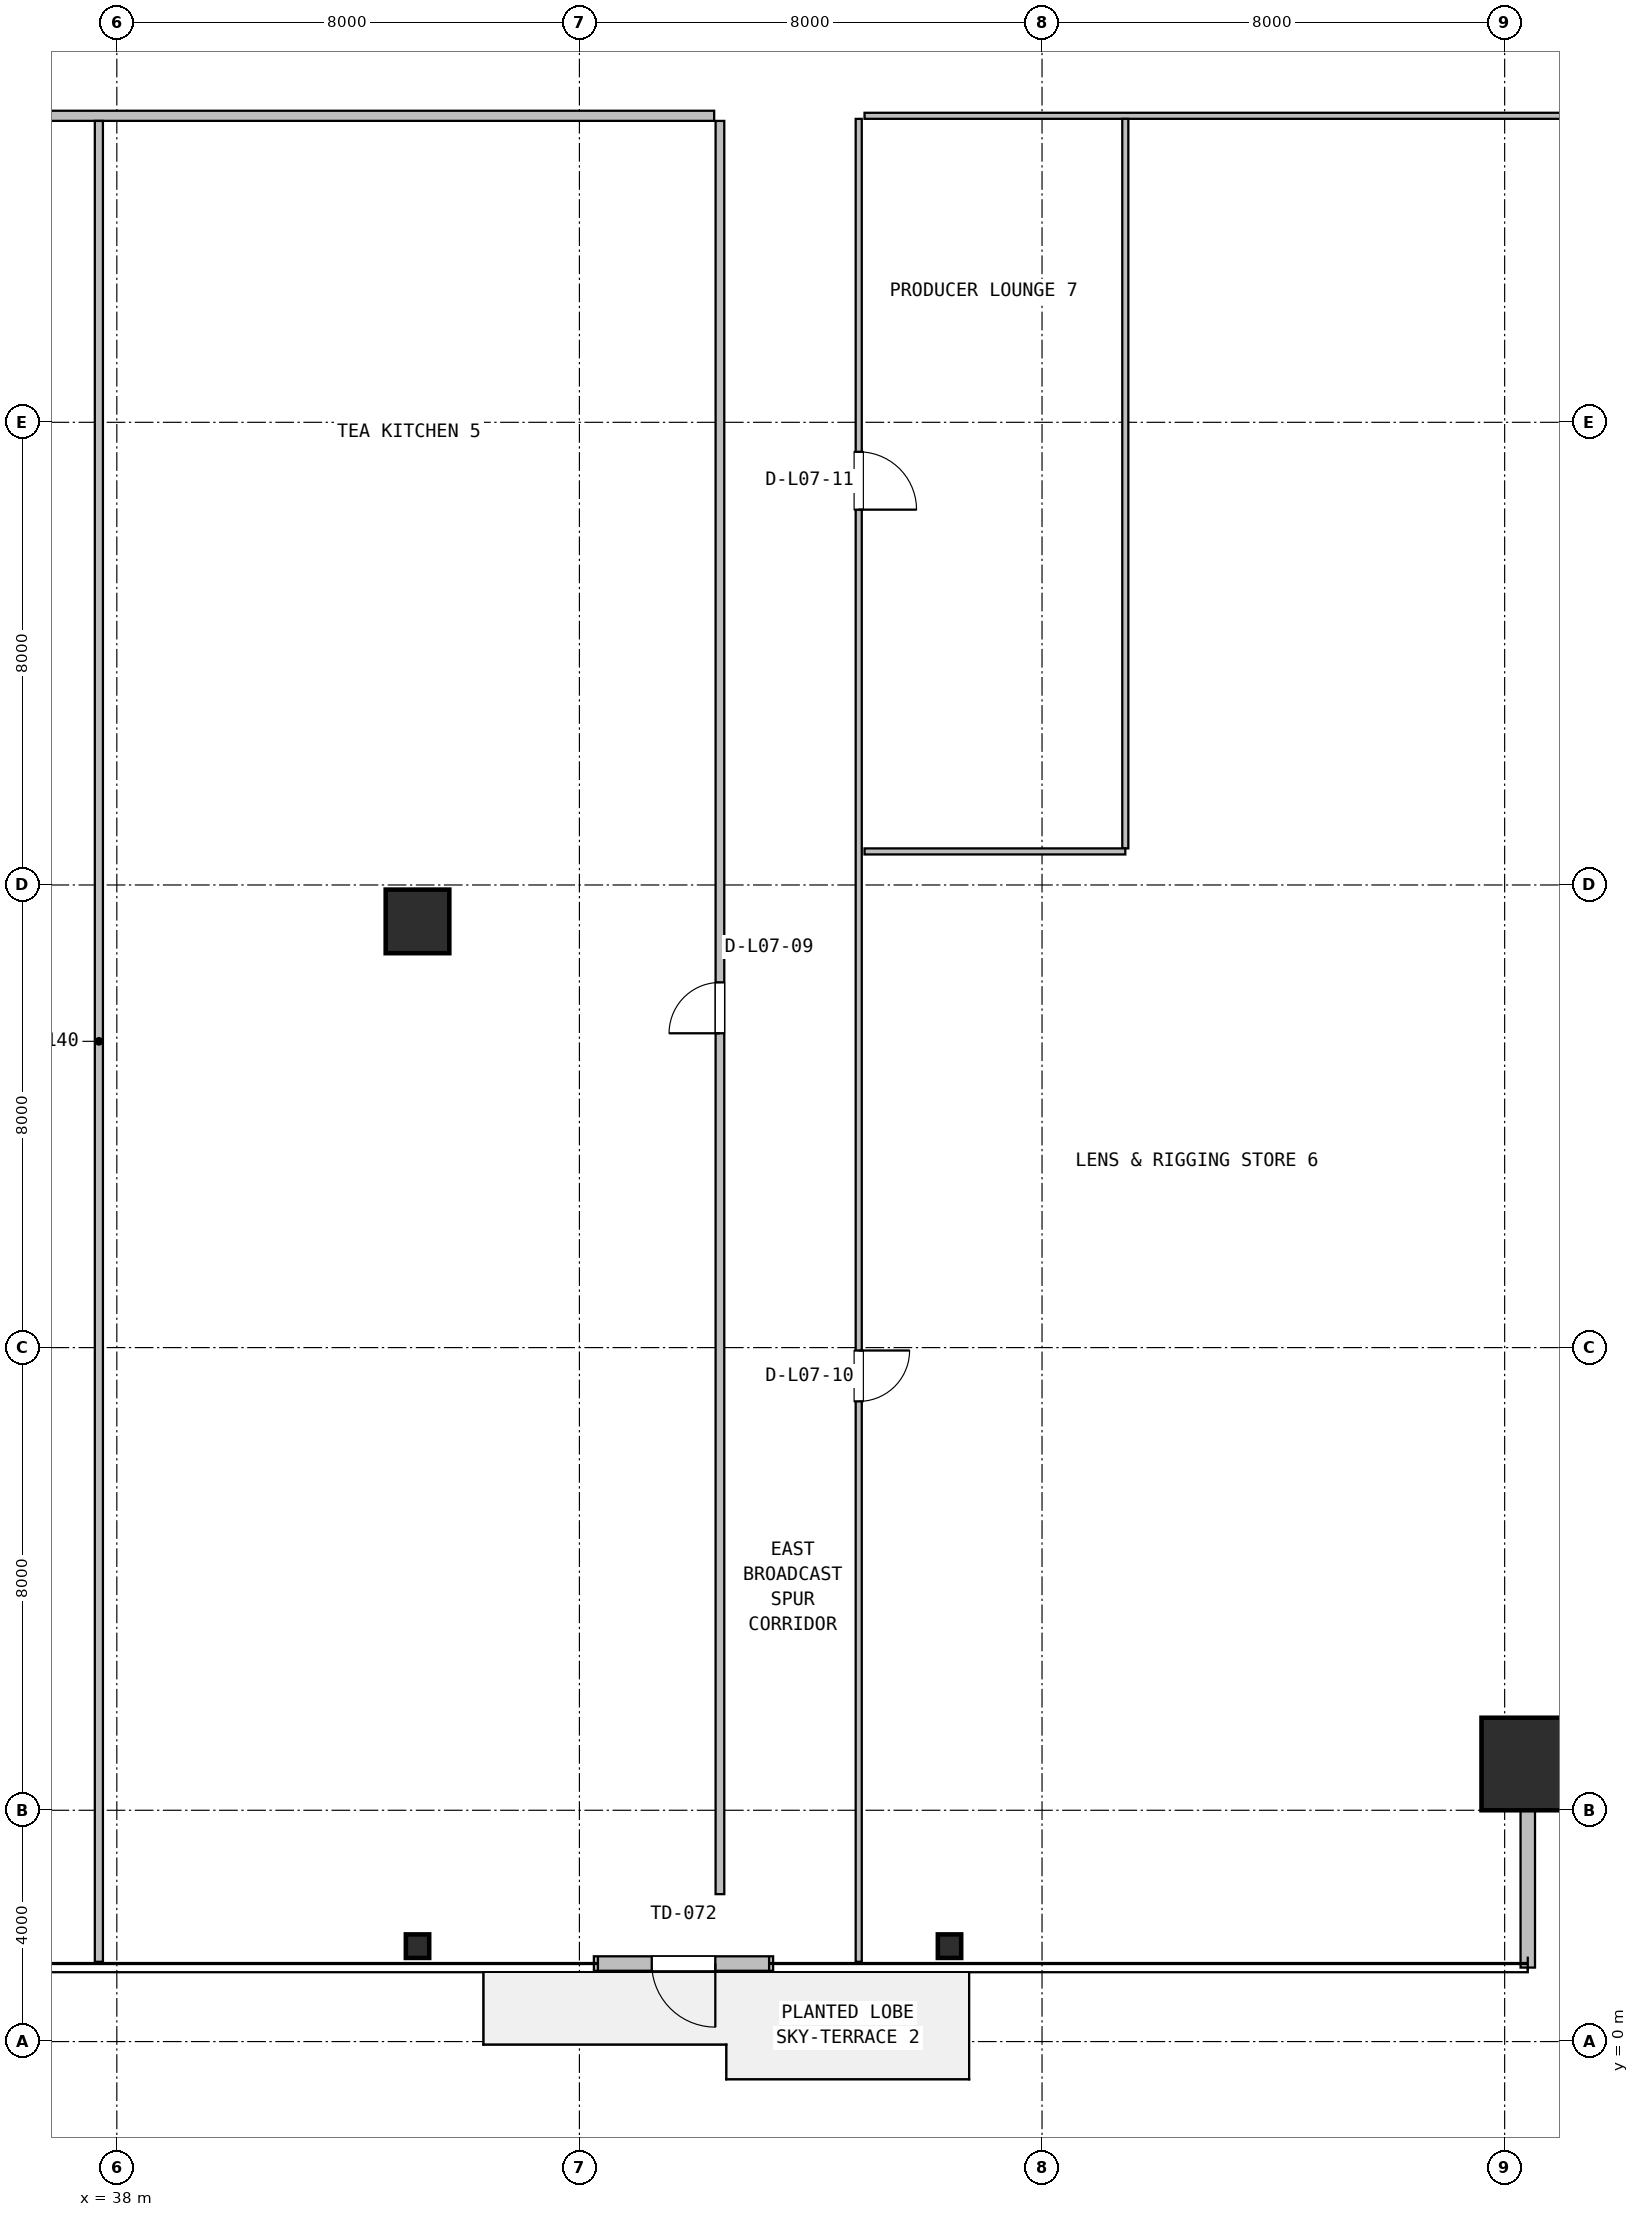
"""IFC4 building model, lengths in metres.
Left out: names, types, materials, properties, quantities, classifications, styles, units other than length and angle.
Written with IfcOpenShell. Run it as: python <this file> out.ifc"""

import sys

from ifc_helpers import new_model, si_unit, direction, frame, frame_2d, origin, origin_2d, place, context, subcontext, project, spatial, rectangle, hollow_rectangle, i_section, extrude, source, transform, mapped, element, fill, save


model = new_model("IFC4")
c1 = context("Model", 3, precision=1e-05, world=origin(), true_north=direction((0.0, 1.0)))
c2 = subcontext(c1, "Body", "Model", "MODEL_VIEW")
j1 = project(units=[si_unit("LENGTHUNIT", "METRE"), si_unit("PLANEANGLEUNIT", "RADIAN")], contexts=[c1])
p1 = place(None, origin())
s1 = spatial("IfcSite", under=j1, at=p1, CompositionType="ELEMENT")
p2 = place(p1, origin())
s2 = spatial("IfcBuilding", under=s1, at=p2, CompositionType="ELEMENT")
p3 = place(p2, frame((0.0, 0.0, 35.4)))
s3 = spatial("IfcBuildingStorey", under=s2, at=p3, CompositionType="ELEMENT", Elevation=35.4)
m1 = source(origin(), c2, "Body", "SweptSolid", [
    extrude(hollow_rectangle(XDim=1.6, YDim=1.6, WallThickness=0.06, at=origin_2d()), origin(), (0.0, 0.0, 1.0), 3.9),
])
p4 = place(p3, frame((62.4, 4.8, 0.0), z_axis=(0.0, 0.0, 1.0), x_axis=(1.0, 0.0, 0.0)))
e1 = element("IfcColumn", 1, at=p4, inside=s3, PredefinedType="COLUMN", context=c2, shape_type="MappedRepresentation", body=[
    mapped(m1, transform((0.0, 0.0, 0.0), x_axis=(1.0, 0.0, 0.0), y_axis=(0.0, 1.0, 0.0), z_axis=(0.0, 0.0, 1.0), scale=1.0)),
])
m2 = source(origin(), c2, "Body", "SweptSolid", [
    extrude(i_section(OverallWidth=0.404, OverallDepth=0.407, WebThickness=0.027, FlangeThickness=0.044, FilletRadius=0.018, at=origin_2d()), origin(), (0.0, 0.0, 1.0), 3.9),
])
for number, where, z_axis, x_axis in (
    (2, (43.2, 1.65, 0.0), (0.0, 0.0, 1.0), (1.0, 0.0, 0.0)),
    (3, (52.4, 1.65, 0.0), (0.0, 0.0, 1.0), (1.0, 0.0, 0.0)),
):
    element("IfcColumn", number, at=place(p3, frame(where, z_axis=z_axis, x_axis=x_axis)), inside=s3, PredefinedType="COLUMN", context=c2, shape_type="MappedRepresentation", body=[
        mapped(m2, transform((0.0, 0.0, 0.0), x_axis=(1.0, 0.0, 0.0), y_axis=(0.0, 1.0, 0.0), z_axis=(0.0, 0.0, 1.0), scale=1.0)),
    ])
m3 = source(origin(), c2, "Body", "SweptSolid", [
    extrude(rectangle(XDim=1.1, YDim=1.1, at=origin_2d()), origin(), (0.0, 0.0, 1.0), 3.9),
])
p5 = place(p3, frame((43.2, 19.37, 0.0), z_axis=(0.0, 0.0, 1.0), x_axis=(1.0, 0.0, 0.0)))
e4 = element("IfcColumn", 4, at=p5, inside=s3, PredefinedType="COLUMN", context=c2, shape_type="MappedRepresentation", body=[
    mapped(m3, transform((0.0, 0.0, 0.0), x_axis=(1.0, 0.0, 0.0), y_axis=(0.0, 1.0, 0.0), z_axis=(0.0, 0.0, 1.0), scale=1.0)),
])
p6 = place(p3, frame((46.25, 1.35, 0.0), z_axis=(0.0, 0.0, 1.0), x_axis=(1.0, 0.0, 0.0)))
e5 = element("IfcWall", 5, at=p6, inside=s3, PredefinedType="SOLIDWALL", context=c2, shape_type="SweptSolid", body=[
    extrude(rectangle(XDim=3.1, YDim=0.25, at=frame_2d((1.55, 0.0))), origin(), (0.0, 0.0, 1.0), 3.63),
])
p7 = place(p6, frame((1.0, 0.0, 0.0)))
e6 = element("IfcOpeningElement", 6, at=p7, cuts=e5, PredefinedType="OPENING", context=c2, shape_type="SweptSolid", body=[
    extrude(rectangle(XDim=1.1, YDim=2.15, at=frame_2d((0.55, 1.075))), frame((0.0, 0.135, 0.0), z_axis=(0.0, -1.0, 0.0), x_axis=(1.0, 0.0, 0.0)), (0.0, 0.0, 1.0), 0.27),
])
p8 = place(p3, frame((62.4, 1.28, 0.0), z_axis=(0.0, 0.0, 1.0), x_axis=(0.0, 1.0, 0.0)))
e7 = element("IfcWall", 7, at=p8, inside=s3, PredefinedType="SOLIDWALL", context=c2, shape_type="SweptSolid", body=[
    extrude(rectangle(XDim=3.6, YDim=0.25, at=frame_2d((1.8, 0.0))), origin(), (0.0, 0.0, 1.0), 3.208),
])
p9 = place(p3, frame((23.54, 33.3, 0.0), z_axis=(0.0, 0.0, 1.0), x_axis=(1.0, 0.0, 0.0)))
e8 = element("IfcWall", 8, at=p9, inside=s3, PredefinedType="PARTITIONING", context=c2, shape_type="SweptSolid", body=[
    extrude(rectangle(XDim=24.79, YDim=0.175, at=frame_2d((12.395, 0.0))), origin(), (0.0, 0.0, 1.0), 2.852),
])
p10 = place(p9, frame((9.62, 0.0, 0.0)))
e9 = element("IfcOpeningElement", 9, at=p10, cuts=e8, PredefinedType="OPENING", context=c2, shape_type="SweptSolid", body=[
    extrude(rectangle(XDim=1.0, YDim=2.1, at=frame_2d((0.5, 1.05))), frame((0.0, 0.098, 0.0), z_axis=(0.0, -1.0, 0.0), x_axis=(1.0, 0.0, 0.0)), (0.0, 0.0, 1.0), 0.195),
])
p11 = place(p3, frame((37.69, 1.38, 0.0), z_axis=(0.0, 0.0, 1.0), x_axis=(0.0, 1.0, 0.0)))
e10 = element("IfcWall", 10, at=p11, inside=s3, PredefinedType="PARTITIONING", context=c2, shape_type="SweptSolid", body=[
    extrude(rectangle(XDim=31.832, YDim=0.14, at=frame_2d((15.916, 0.0))), origin(), (0.0, 0.0, 1.0), 2.852),
])
p12 = place(p3, frame((48.43, 2.55, 0.0), z_axis=(0.0, 0.0, 1.0), x_axis=(0.0, 1.0, 0.0)))
e11 = element("IfcWall", 11, at=p12, inside=s3, PredefinedType="PARTITIONING", context=c2, shape_type="SweptSolid", body=[
    extrude(rectangle(XDim=30.662, YDim=0.15, at=frame_2d((15.331, 0.0))), origin(), (0.0, 0.0, 1.0), 3.322),
])
p13 = place(p12, frame((14.885, 0.0, 0.0)))
e12 = element("IfcOpeningElement", 12, at=p13, cuts=e11, PredefinedType="OPENING", context=c2, shape_type="SweptSolid", body=[
    extrude(rectangle(XDim=0.88, YDim=2.06, at=frame_2d((0.44, 1.03))), frame((0.0, 0.085, 0.0), z_axis=(0.0, -1.0, 0.0), x_axis=(1.0, 0.0, 0.0)), (0.0, 0.0, 1.0), 0.17),
])
p14 = place(p3, frame((50.93, 33.3, 0.0), z_axis=(0.0, 0.0, 1.0), x_axis=(1.0, 0.0, 0.0)))
e13 = element("IfcWall", 13, at=p14, inside=s3, PredefinedType="PARTITIONING", context=c2, shape_type="SweptSolid", body=[
    extrude(rectangle(XDim=14.89, YDim=0.105, at=frame_2d((7.445, 0.0))), origin(), (0.0, 0.0, 1.0), 3.208),
])
p15 = place(p3, frame((55.44, 20.632, 0.0), z_axis=(0.0, 0.0, 1.0), x_axis=(0.0, 1.0, 0.0)))
e14 = element("IfcWall", 14, at=p15, inside=s3, PredefinedType="PARTITIONING", context=c2, shape_type="SweptSolid", body=[
    extrude(rectangle(XDim=12.615, YDim=0.105, at=frame_2d((6.308, 0.0))), origin(), (0.0, 0.0, 1.0), 3.322),
])
p16 = place(p3, frame((50.93, 20.58, 0.0), z_axis=(0.0, 0.0, 1.0), x_axis=(1.0, 0.0, 0.0)))
e15 = element("IfcWall", 15, at=p16, inside=s3, PredefinedType="PARTITIONING", context=c2, shape_type="SweptSolid", body=[
    extrude(rectangle(XDim=4.51, YDim=0.105, at=frame_2d((2.255, 0.0))), origin(), (0.0, 0.0, 1.0), 3.63),
])
p17 = place(p3, frame((50.83, 1.38, 0.0), z_axis=(0.0, 0.0, 1.0), x_axis=(0.0, 1.0, 0.0)))
e16 = element("IfcWall", 16, at=p17, inside=s3, PredefinedType="PARTITIONING", context=c2, shape_type="SweptSolid", body=[
    extrude(rectangle(XDim=31.867, YDim=0.105, at=frame_2d((15.934, 0.0))), origin(), (0.0, 0.0, 1.0), 3.208),
])
p18 = place(p17, frame((9.69, 0.0, 0.0)))
e17 = element("IfcOpeningElement", 17, at=p18, cuts=e16, PredefinedType="OPENING", context=c2, shape_type="SweptSolid", body=[
    extrude(rectangle(XDim=0.88, YDim=2.06, at=frame_2d((0.44, 1.03))), frame((0.0, 0.062, 0.0), z_axis=(0.0, -1.0, 0.0), x_axis=(1.0, 0.0, 0.0)), (0.0, 0.0, 1.0), 0.125),
])
p19 = place(p17, frame((25.11, 0.0, 0.0)))
e18 = element("IfcOpeningElement", 18, at=p19, cuts=e16, PredefinedType="OPENING", context=c2, shape_type="SweptSolid", body=[
    extrude(rectangle(XDim=1.0, YDim=2.1, at=frame_2d((0.5, 1.05))), frame((0.0, 0.062, 0.0), z_axis=(0.0, -1.0, 0.0), x_axis=(1.0, 0.0, 0.0)), (0.0, 0.0, 1.0), 0.125),
])
m4 = source(origin(), c2, "Body", "SweptSolid", [
    extrude(rectangle(XDim=1.1, YDim=2.15, at=frame_2d((0.55, 1.075))), frame((0.0, 0.025, 0.0), z_axis=(0.0, -1.0, 0.0), x_axis=(1.0, 0.0, 0.0)), (0.0, 0.0, 1.0), 0.05),
])
p20 = place(p7, frame((1.1, 0.0, 0.0), z_axis=(0.0, 0.0, 1.0), x_axis=(-1.0, 0.0, 0.0)))
e19 = element("IfcDoor", 19, at=p20, inside=s3, OperationType="SINGLE_SWING_RIGHT", PredefinedType="DOOR", context=c2, shape_type="MappedRepresentation", body=[
    mapped(m4, transform((0.0, 0.0, 0.0), x_axis=(1.0, 0.0, 0.0), y_axis=(0.0, 1.0, 0.0), z_axis=(0.0, 0.0, 1.0), scale=1.0)),
])
fill(e6, e19)
m5 = source(origin(), c2, "Body", "SweptSolid", [
    extrude(rectangle(XDim=0.88, YDim=2.06, at=frame_2d((0.44, 1.03))), frame((0.0, 0.025, 0.0), z_axis=(0.0, -1.0, 0.0), x_axis=(1.0, 0.0, 0.0)), (0.0, 0.0, 1.0), 0.05),
])
p21 = place(p13, origin())
e20 = element("IfcDoor", 20, at=p21, inside=s3, OperationType="SINGLE_SWING_LEFT", PredefinedType="DOOR", context=c2, shape_type="MappedRepresentation", body=[
    mapped(m5, transform((0.0, 0.0, 0.0), x_axis=(1.0, 0.0, 0.0), y_axis=(0.0, 1.0, 0.0), z_axis=(0.0, 0.0, 1.0), scale=1.0)),
])
fill(e12, e20)
p22 = place(p18, frame((0.88, 0.0, 0.0), z_axis=(0.0, 0.0, 1.0), x_axis=(-1.0, 0.0, 0.0)))
e21 = element("IfcDoor", 21, at=p22, inside=s3, OperationType="SINGLE_SWING_RIGHT", PredefinedType="DOOR", context=c2, shape_type="MappedRepresentation", body=[
    mapped(m5, transform((0.0, 0.0, 0.0), x_axis=(1.0, 0.0, 0.0), y_axis=(0.0, 1.0, 0.0), z_axis=(0.0, 0.0, 1.0), scale=1.0)),
])
fill(e17, e21)
m6 = source(origin(), c2, "Body", "SweptSolid", [
    extrude(rectangle(XDim=1.0, YDim=2.1, at=frame_2d((0.5, 1.05))), frame((0.0, 0.025, 0.0), z_axis=(0.0, -1.0, 0.0), x_axis=(1.0, 0.0, 0.0)), (0.0, 0.0, 1.0), 0.05),
])
p23 = place(p19, frame((1.0, 0.0, 0.0), z_axis=(0.0, 0.0, 1.0), x_axis=(-1.0, 0.0, 0.0)))
e22 = element("IfcDoor", 22, at=p23, inside=s3, OperationType="SINGLE_SWING_LEFT", PredefinedType="DOOR", context=c2, shape_type="MappedRepresentation", body=[
    mapped(m6, transform((0.0, 0.0, 0.0), x_axis=(1.0, 0.0, 0.0), y_axis=(0.0, 1.0, 0.0), z_axis=(0.0, 0.0, 1.0), scale=1.0)),
])
fill(e18, e22)
save(model, sys.argv[1])
